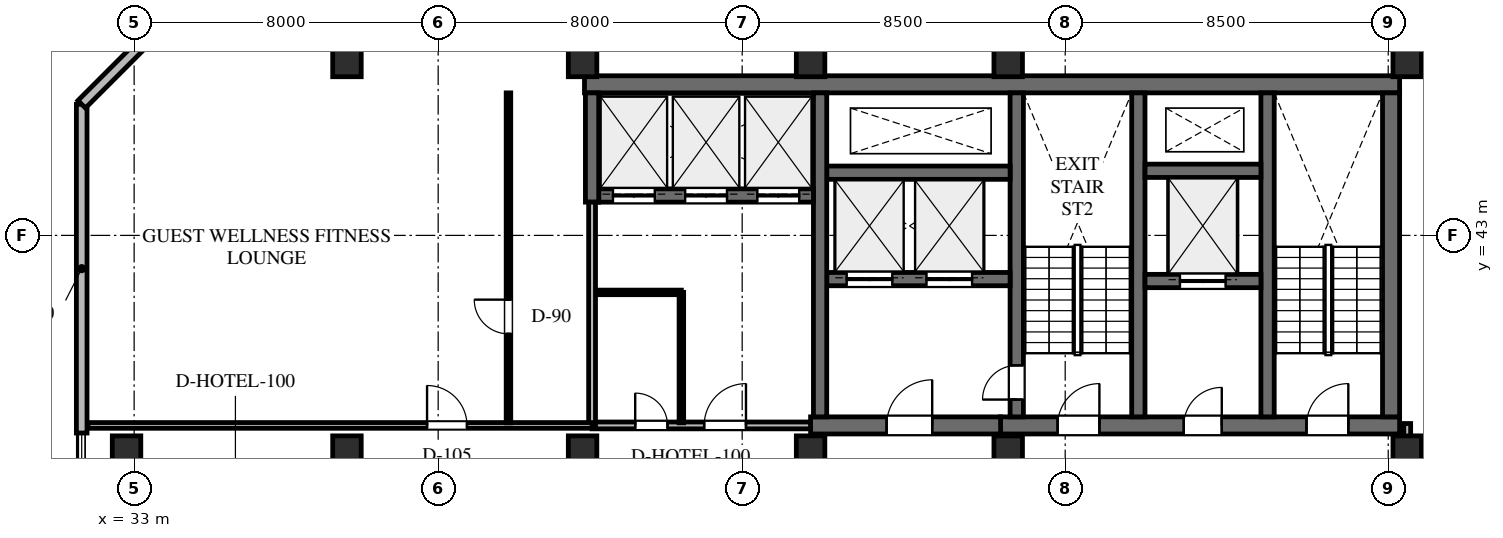
"""IFC4 building model, lengths in metres.
Left out: names, types, materials, properties, quantities, classifications, styles, units other than length and angle.
Written with IfcOpenShell. Run it as: python <this file> out.ifc"""

import sys

from ifc_helpers import new_model, si_unit, direction, frame, frame_2d, origin, origin_2d, place, context, subcontext, project, spatial, rectangle, extrude, element, fill, save


model = new_model("IFC4")
c1 = context("Model", 3, precision=1e-05, world=origin(), true_north=direction((0.0, 1.0)))
c2 = subcontext(c1, "Body", "Model", "MODEL_VIEW")
j1 = project(units=[si_unit("LENGTHUNIT", "METRE"), si_unit("PLANEANGLEUNIT", "RADIAN")], contexts=[c1])
p1 = place(None, origin())
s1 = spatial("IfcSite", under=j1, at=p1, CompositionType="ELEMENT")
p2 = place(p1, origin())
s2 = spatial("IfcBuilding", under=s1, at=p2, CompositionType="ELEMENT")
p3 = place(p2, frame((0.0, 0.0, 282.3)))
s3 = spatial("IfcBuildingStorey", under=s2, at=p3, CompositionType="ELEMENT", Elevation=282.3)
p4 = place(p3, frame((44.85, 46.975, 0.0), z_axis=(0.0, 0.0, 1.0), x_axis=(1.0, 0.0, 0.0)))
e1 = element("IfcWall", 1, at=p4, inside=s3, PredefinedType="SHEAR", context=c2, shape_type="SweptSolid", body=[
    extrude(rectangle(XDim=21.45, YDim=0.45, at=frame_2d((10.725, 0.0))), origin(), (0.0, 0.0, 1.0), 3.6),
])
p5 = place(p3, frame((55.8, 38.0, 0.0), z_axis=(0.0, 0.0, 1.0), x_axis=(1.0, 0.0, 0.0)))
e2 = element("IfcWall", 2, at=p5, inside=s3, PredefinedType="SHEAR", context=c2, shape_type="SweptSolid", body=[
    extrude(rectangle(XDim=10.5, YDim=0.45, at=frame_2d((5.25, 0.0))), origin(), (0.0, 0.0, 1.0), 3.6),
])
p6 = place(p5, frame((1.5, 0.0, 0.0)))
e3 = element("IfcOpeningElement", 3, at=p6, cuts=e2, PredefinedType="OPENING", context=c2, shape_type="SweptSolid", body=[
    extrude(rectangle(XDim=1.1, YDim=2.2, at=frame_2d((0.55, 1.1))), frame((0.0, 0.235, 0.0), z_axis=(0.0, -1.0, 0.0), x_axis=(1.0, 0.0, 0.0)), (0.0, 0.0, 1.0), 0.47),
])
p7 = place(p5, frame((4.82, 0.0, 0.0)))
e4 = element("IfcOpeningElement", 4, at=p7, cuts=e2, PredefinedType="OPENING", context=c2, shape_type="SweptSolid", body=[
    extrude(rectangle(XDim=1.0, YDim=2.15, at=frame_2d((0.5, 1.075))), frame((0.0, 0.235, 0.0), z_axis=(0.0, -1.0, 0.0), x_axis=(1.0, 0.0, 0.0)), (0.0, 0.0, 1.0), 0.47),
])
p8 = place(p5, frame((8.05, 0.0, 0.0)))
e5 = element("IfcOpeningElement", 5, at=p8, cuts=e2, PredefinedType="OPENING", context=c2, shape_type="SweptSolid", body=[
    extrude(rectangle(XDim=1.1, YDim=2.2, at=frame_2d((0.55, 1.1))), frame((0.0, 0.235, 0.0), z_axis=(0.0, -1.0, 0.0), x_axis=(1.0, 0.0, 0.0)), (0.0, 0.0, 1.0), 0.47),
])
p9 = place(p3, frame((66.075, 38.225, 0.0), z_axis=(0.0, 0.0, 1.0), x_axis=(0.0, 1.0, 0.0)))
e6 = element("IfcWall", 6, at=p9, inside=s3, PredefinedType="SHEAR", context=c2, shape_type="SweptSolid", body=[
    extrude(rectangle(XDim=8.525, YDim=0.45, at=frame_2d((4.262, 0.0))), origin(), (0.0, 0.0, 1.0), 3.6),
])
for number, where, z_axis, x_axis in (
    (7, (62.825, 38.225, 0.0), (0.0, 0.0, 1.0), (0.0, 1.0, 0.0)),
    (8, (59.425, 38.225, 0.0), (0.0, 0.0, 1.0), (0.0, 1.0, 0.0)),
):
    element("IfcWall", number, at=place(p3, frame(where, z_axis=z_axis, x_axis=x_axis)), inside=s3, PredefinedType="SHEAR", context=c2, shape_type="SweptSolid", body=[
        extrude(rectangle(XDim=8.525, YDim=0.35, at=frame_2d((4.262, 0.0))), origin(), (0.0, 0.0, 1.0), 3.6),
    ])
p10 = place(p3, frame((56.225, 38.225, 0.0), z_axis=(0.0, 0.0, 1.0), x_axis=(0.0, 1.0, 0.0)))
e9 = element("IfcWall", 9, at=p10, inside=s3, PredefinedType="SHEAR", context=c2, shape_type="SweptSolid", body=[
    extrude(rectangle(XDim=8.525, YDim=0.35, at=frame_2d((4.262, 0.0))), origin(), (0.0, 0.0, 1.0), 3.6),
])
p11 = place(p10, frame((0.455, 0.0, 0.0)))
e10 = element("IfcOpeningElement", 10, at=p11, cuts=e9, PredefinedType="OPENING", context=c2, shape_type="SweptSolid", body=[
    extrude(rectangle(XDim=0.9, YDim=2.15, at=frame_2d((0.45, 1.075))), frame((0.0, 0.185, 0.0), z_axis=(0.0, -1.0, 0.0), x_axis=(1.0, 0.0, 0.0)), (0.0, 0.0, 1.0), 0.37),
])
p12 = place(p3, frame((59.6, 41.8, 0.0), z_axis=(0.0, 0.0, 1.0), x_axis=(1.0, 0.0, 0.0)))
e11 = element("IfcWall", 11, at=p12, inside=s3, PredefinedType="SHEAR", context=c2, shape_type="SweptSolid", body=[
    extrude(rectangle(XDim=3.05, YDim=0.35, at=frame_2d((1.525, 0.0))), origin(), (0.0, 0.0, 1.0), 3.6),
])
p13 = place(p12, frame((0.92, 0.0, 0.0)))
e12 = element("IfcOpeningElement", 12, at=p13, cuts=e11, PredefinedType="OPENING", context=c2, shape_type="SweptSolid", body=[
    extrude(rectangle(XDim=1.2, YDim=2.2, at=frame_2d((0.6, 1.1))), frame((0.0, 0.185, 0.0), z_axis=(0.0, -1.0, 0.0), x_axis=(1.0, 0.0, 0.0)), (0.0, 0.0, 1.0), 0.37),
])
p14 = place(p3, frame((59.6, 44.7, 0.0), z_axis=(0.0, 0.0, 1.0), x_axis=(1.0, 0.0, 0.0)))
e13 = element("IfcWall", 13, at=p14, inside=s3, PredefinedType="SHEAR", context=c2, shape_type="SweptSolid", body=[
    extrude(rectangle(XDim=3.05, YDim=0.35, at=frame_2d((1.525, 0.0))), origin(), (0.0, 0.0, 1.0), 3.6),
])
p15 = place(p3, frame((50.8, 38.0, 0.0), z_axis=(0.0, 0.0, 1.0), x_axis=(1.0, 0.0, 0.0)))
e14 = element("IfcWall", 14, at=p15, inside=s3, PredefinedType="SHEAR", context=c2, shape_type="SweptSolid", body=[
    extrude(rectangle(XDim=5.0, YDim=0.45, at=frame_2d((2.5, 0.0))), origin(), (0.0, 0.0, 1.0), 3.6),
])
p16 = place(p15, frame((2.0, 0.0, 0.0)))
e15 = element("IfcOpeningElement", 15, at=p16, cuts=e14, PredefinedType="OPENING", context=c2, shape_type="SweptSolid", body=[
    extrude(rectangle(XDim=1.2, YDim=2.2, at=frame_2d((0.6, 1.1))), frame((0.0, 0.235, 0.0), z_axis=(0.0, -1.0, 0.0), x_axis=(1.0, 0.0, 0.0)), (0.0, 0.0, 1.0), 0.47),
])
p17 = place(p3, frame((51.225, 41.85, 0.0), z_axis=(0.0, 0.0, 1.0), x_axis=(1.0, 0.0, 0.0)))
e16 = element("IfcWall", 16, at=p17, inside=s3, PredefinedType="SHEAR", context=c2, shape_type="SweptSolid", body=[
    extrude(rectangle(XDim=4.825, YDim=0.35, at=frame_2d((2.413, 0.0))), origin(), (0.0, 0.0, 1.0), 3.6),
])
p18 = place(p17, frame((0.525, 0.0, 0.0)))
e17 = element("IfcOpeningElement", 17, at=p18, cuts=e16, PredefinedType="OPENING", context=c2, shape_type="SweptSolid", body=[
    extrude(rectangle(XDim=1.2, YDim=2.2, at=frame_2d((0.6, 1.1))), frame((0.0, 0.185, 0.0), z_axis=(0.0, -1.0, 0.0), x_axis=(1.0, 0.0, 0.0)), (0.0, 0.0, 1.0), 0.37),
])
p19 = place(p17, frame((2.625, 0.0, 0.0)))
e18 = element("IfcOpeningElement", 18, at=p19, cuts=e16, PredefinedType="OPENING", context=c2, shape_type="SweptSolid", body=[
    extrude(rectangle(XDim=1.2, YDim=2.2, at=frame_2d((0.6, 1.1))), frame((0.0, 0.185, 0.0), z_axis=(0.0, -1.0, 0.0), x_axis=(1.0, 0.0, 0.0)), (0.0, 0.0, 1.0), 0.37),
])
p20 = place(p3, frame((51.225, 44.65, 0.0), z_axis=(0.0, 0.0, 1.0), x_axis=(1.0, 0.0, 0.0)))
e19 = element("IfcWall", 19, at=p20, inside=s3, PredefinedType="SHEAR", context=c2, shape_type="SweptSolid", body=[
    extrude(rectangle(XDim=4.825, YDim=0.35, at=frame_2d((2.413, 0.0))), origin(), (0.0, 0.0, 1.0), 3.6),
])
p21 = place(p3, frame((51.05, 38.225, 0.0), z_axis=(0.0, 0.0, 1.0), x_axis=(0.0, 1.0, 0.0)))
e20 = element("IfcWall", 20, at=p21, inside=s3, PredefinedType="SHEAR", context=c2, shape_type="SweptSolid", body=[
    extrude(rectangle(XDim=8.525, YDim=0.35, at=frame_2d((4.262, 0.0))), origin(), (0.0, 0.0, 1.0), 3.6),
])
p22 = place(p3, frame((45.225, 44.05, 0.0), z_axis=(0.0, 0.0, 1.0), x_axis=(1.0, 0.0, 0.0)))
e21 = element("IfcWall", 21, at=p22, inside=s3, PredefinedType="SHEAR", context=c2, shape_type="SweptSolid", body=[
    extrude(rectangle(XDim=5.65, YDim=0.35, at=frame_2d((2.825, 0.0))), origin(), (0.0, 0.0, 1.0), 3.6),
])
p23 = place(p22, frame((0.375, 0.0, 0.0)))
e22 = element("IfcOpeningElement", 22, at=p23, cuts=e21, PredefinedType="OPENING", context=c2, shape_type="SweptSolid", body=[
    extrude(rectangle(XDim=1.1, YDim=2.2, at=frame_2d((0.55, 1.1))), frame((0.0, 0.185, 0.0), z_axis=(0.0, -1.0, 0.0), x_axis=(1.0, 0.0, 0.0)), (0.0, 0.0, 1.0), 0.37),
])
p24 = place(p22, frame((2.275, 0.0, 0.0)))
e23 = element("IfcOpeningElement", 23, at=p24, cuts=e21, PredefinedType="OPENING", context=c2, shape_type="SweptSolid", body=[
    extrude(rectangle(XDim=1.1, YDim=2.2, at=frame_2d((0.55, 1.1))), frame((0.0, 0.185, 0.0), z_axis=(0.0, -1.0, 0.0), x_axis=(1.0, 0.0, 0.0)), (0.0, 0.0, 1.0), 0.37),
])
p25 = place(p22, frame((4.175, 0.0, 0.0)))
e24 = element("IfcOpeningElement", 24, at=p25, cuts=e21, PredefinedType="OPENING", context=c2, shape_type="SweptSolid", body=[
    extrude(rectangle(XDim=1.1, YDim=2.2, at=frame_2d((0.55, 1.1))), frame((0.0, 0.185, 0.0), z_axis=(0.0, -1.0, 0.0), x_axis=(1.0, 0.0, 0.0)), (0.0, 0.0, 1.0), 0.37),
])
p26 = place(p3, frame((45.05, 43.875, 0.0), z_axis=(0.0, 0.0, 1.0), x_axis=(0.0, 1.0, 0.0)))
e25 = element("IfcWall", 25, at=p26, inside=s3, PredefinedType="SHEAR", context=c2, shape_type="SweptSolid", body=[
    extrude(rectangle(XDim=2.875, YDim=0.35, at=frame_2d((1.438, 0.0))), origin(), (0.0, 0.0, 1.0), 3.6),
])
for number, where, z_axis, x_axis in (
    (26, (66.5, 47.55, 0.0), (0.0, 0.0, 1.0), (1.0, 0.0, 0.0)),
    (27, (56.0, 47.55, 0.0), (0.0, 0.0, 1.0), (1.0, 0.0, 0.0)),
    (28, (66.5, 37.35, 0.0), (0.0, 0.0, 1.0), (1.0, 0.0, 0.0)),
    (29, (56.0, 37.35, 0.0), (0.0, 0.0, 1.0), (1.0, 0.0, 0.0)),
    (30, (50.8, 47.55, 0.0), (0.0, 0.0, 1.0), (1.0, 0.0, 0.0)),
    (31, (50.8, 37.35, 0.0), (0.0, 0.0, 1.0), (1.0, 0.0, 0.0)),
    (32, (44.8, 37.35, 0.0), (0.0, 0.0, 1.0), (1.0, 0.0, 0.0)),
    (33, (44.8, 47.55, 0.0), (0.0, 0.0, 1.0), (1.0, 0.0, 0.0)),
    (34, (38.6, 37.35, 0.0), (0.0, 0.0, 1.0), (1.0, 0.0, 0.0)),
    (35, (38.6, 47.55, 0.0), (0.0, 0.0, 1.0), (1.0, 0.0, 0.0)),
    (36, (32.8, 37.35, 0.0), (0.0, 0.0, 1.0), (1.0, 0.0, 0.0)),
):
    element("IfcColumn", number, at=place(p3, frame(where, z_axis=z_axis, x_axis=x_axis)), inside=s3, PredefinedType="COLUMN", context=c2, shape_type="SweptSolid", body=[
        extrude(rectangle(XDim=0.75, YDim=0.75, at=origin_2d()), origin(), (0.0, 0.0, 1.0), 3.6),
    ])
p27 = place(p3, frame((31.62, 37.8, 0.0), z_axis=(0.0, 0.0, 1.0), x_axis=(0.0, 1.0, 0.0)))
e37 = element("IfcWall", 37, at=p27, inside=s3, PredefinedType="STANDARD", context=c2, shape_type="SweptSolid", body=[
    extrude(rectangle(XDim=8.65, YDim=0.28, at=frame_2d((4.325, 0.0))), origin(), (0.0, 0.0, 1.0), 3.365),
])
p28 = place(p3, frame((31.62, 46.45, 0.0), z_axis=(0.0, 0.0, 1.0), x_axis=(0.707106781187, 0.707106781187, 0.0)))
e38 = element("IfcWall", 38, at=p28, inside=s3, PredefinedType="STANDARD", context=c2, shape_type="SweptSolid", body=[
    extrude(rectangle(XDim=2.729, YDim=0.28, at=frame_2d((1.365, 0.0))), origin(), (0.0, 0.0, 1.0), 3.365),
])
p29 = place(p3, frame((68.375, 37.8, 0.0), z_axis=(0.0, 0.0, 1.0), x_axis=(-0.139171056495, -0.99026835607, 0.0)))
e39 = element("IfcWall", 39, at=p29, inside=s3, PredefinedType="STANDARD", context=c2, shape_type="SweptSolid", body=[
    extrude(rectangle(XDim=16.923, YDim=0.28, at=frame_2d((8.462, 0.0))), origin(), (0.0, 0.0, 1.0), 3.365),
])
p30 = place(p29, frame((7.915, 0.0, 0.0)))
e40 = element("IfcOpeningElement", 40, at=p30, cuts=e39, PredefinedType="OPENING", context=c2, shape_type="SweptSolid", body=[
    extrude(rectangle(XDim=1.0, YDim=2.15, at=frame_2d((0.5, 1.075))), frame((0.0, 0.15, 0.0), z_axis=(0.0, -1.0, 0.0), x_axis=(1.0, 0.0, 0.0)), (0.0, 0.0, 1.0), 0.3),
])
p31 = place(p29, frame((3.634, 0.0, 0.65)))
e41 = element("IfcOpeningElement", 41, at=p31, cuts=e39, PredefinedType="OPENING", context=c2, shape_type="SweptSolid", body=[
    extrude(rectangle(XDim=1.8, YDim=2.1, at=frame_2d((0.9, 1.05))), frame((0.0, 0.15, 0.0), z_axis=(0.0, -1.0, 0.0), x_axis=(1.0, 0.0, 0.0)), (0.0, 0.0, 1.0), 0.3),
])
p32 = place(p29, frame((11.852, 0.0, 0.65)))
e42 = element("IfcOpeningElement", 42, at=p32, cuts=e39, PredefinedType="OPENING", context=c2, shape_type="SweptSolid", body=[
    extrude(rectangle(XDim=1.8, YDim=2.1, at=frame_2d((0.9, 1.05))), frame((0.0, 0.15, 0.0), z_axis=(0.0, -1.0, 0.0), x_axis=(1.0, 0.0, 0.0)), (0.0, 0.0, 1.0), 0.3),
])
p33 = place(p3, frame((45.05, 38.0, 0.0), z_axis=(0.0, 0.0, 1.0), x_axis=(1.0, 0.0, 0.0)))
e43 = element("IfcWall", 43, at=p33, inside=s3, PredefinedType="STANDARD", context=c2, shape_type="SweptSolid", body=[
    extrude(rectangle(XDim=5.75, YDim=0.18, at=frame_2d((2.875, 0.0))), origin(), (0.0, 0.0, 1.0), 2.754),
])
p34 = place(p33, frame((1.135, 0.0, 0.0)))
e44 = element("IfcOpeningElement", 44, at=p34, cuts=e43, PredefinedType="OPENING", context=c2, shape_type="SweptSolid", body=[
    extrude(rectangle(XDim=0.85, YDim=2.1, at=frame_2d((0.425, 1.05))), frame((0.0, 0.1, 0.0), z_axis=(0.0, -1.0, 0.0), x_axis=(1.0, 0.0, 0.0)), (0.0, 0.0, 1.0), 0.2),
])
p35 = place(p33, frame((2.95, 0.0, 0.0)))
e45 = element("IfcOpeningElement", 45, at=p35, cuts=e43, PredefinedType="OPENING", context=c2, shape_type="SweptSolid", body=[
    extrude(rectangle(XDim=1.1, YDim=2.2, at=frame_2d((0.55, 1.1))), frame((0.0, 0.1, 0.0), z_axis=(0.0, -1.0, 0.0), x_axis=(1.0, 0.0, 0.0)), (0.0, 0.0, 1.0), 0.2),
])
p36 = place(p3, frame((47.4, 38.068, 0.0), z_axis=(0.0, 0.0, 1.0), x_axis=(0.0, 1.0, 0.0)))
e46 = element("IfcWall", 46, at=p36, inside=s3, PredefinedType="PARTITIONING", context=c2, shape_type="SweptSolid", body=[
    extrude(rectangle(XDim=3.432, YDim=0.12, at=frame_2d((1.716, 0.0))), origin(), (0.0, 0.0, 1.0), 3.365),
])
p37 = place(p3, frame((45.118, 41.5, 0.0), z_axis=(0.0, 0.0, 1.0), x_axis=(1.0, 0.0, 0.0)))
e47 = element("IfcWall", 47, at=p37, inside=s3, PredefinedType="PARTITIONING", context=c2, shape_type="SweptSolid", body=[
    extrude(rectangle(XDim=2.282, YDim=0.12, at=frame_2d((1.141, 0.0))), origin(), (0.0, 0.0, 1.0), 3.365),
])
p38 = place(p3, frame((45.05, 38.0, 0.0), z_axis=(0.0, 0.0, 1.0), x_axis=(0.0, 1.0, 0.0)))
e48 = element("IfcWall", 48, at=p38, inside=s3, PredefinedType="STANDARD", context=c2, shape_type="SweptSolid", body=[
    extrude(rectangle(XDim=5.875, YDim=0.18, at=frame_2d((2.938, 0.0))), origin(), (0.0, 0.0, 1.0), 2.754),
])
p39 = place(p3, frame((31.785, 38.0, 0.0), z_axis=(0.0, 0.0, 1.0), x_axis=(1.0, 0.0, 0.0)))
e49 = element("IfcWall", 49, at=p39, inside=s3, PredefinedType="PARTITIONING", context=c2, shape_type="SweptSolid", body=[
    extrude(rectangle(XDim=13.265, YDim=0.15, at=frame_2d((6.633, 0.0))), origin(), (0.0, 0.0, 1.0), 2.754),
])
p40 = place(p39, frame((8.923, 0.0, 0.0)))
e50 = element("IfcOpeningElement", 50, at=p40, cuts=e49, PredefinedType="OPENING", context=c2, shape_type="SweptSolid", body=[
    extrude(rectangle(XDim=1.05, YDim=2.2, at=frame_2d((0.525, 1.1))), frame((0.0, 0.085, 0.0), z_axis=(0.0, -1.0, 0.0), x_axis=(1.0, 0.0, 0.0)), (0.0, 0.0, 1.0), 0.17),
])
p41 = place(p3, frame((42.85, 38.068, 0.0), z_axis=(0.0, 0.0, 1.0), x_axis=(0.0, 1.0, 0.0)))
e51 = element("IfcWall", 51, at=p41, inside=s3, PredefinedType="PARTITIONING", context=c2, shape_type="SweptSolid", body=[
    extrude(rectangle(XDim=8.682, YDim=0.12, at=frame_2d((4.341, 0.0))), origin(), (0.0, 0.0, 1.0), 3.365),
])
p42 = place(p41, frame((2.342, 0.0, 0.0)))
e52 = element("IfcOpeningElement", 52, at=p42, cuts=e51, PredefinedType="OPENING", context=c2, shape_type="SweptSolid", body=[
    extrude(rectangle(XDim=0.9, YDim=2.1, at=frame_2d((0.45, 1.05))), frame((0.0, 0.07, 0.0), z_axis=(0.0, -1.0, 0.0), x_axis=(1.0, 0.0, 0.0)), (0.0, 0.0, 1.0), 0.14),
])
p43 = place(p3, frame((66.5, 35.468, 0.0), z_axis=(0.0, 0.0, 1.0), x_axis=(0.0, 1.0, 0.0)))
e53 = element("IfcWall", 53, at=p43, inside=s3, PredefinedType="STANDARD", context=c2, shape_type="SweptSolid", body=[
    extrude(rectangle(XDim=2.582, YDim=0.18, at=frame_2d((1.291, 0.0))), origin(), (0.0, 0.0, 1.0), 2.754),
])
p44 = place(p6, origin())
e54 = element("IfcDoor", 54, at=p44, inside=s3, OperationType="SINGLE_SWING_RIGHT", PredefinedType="DOOR", context=c2, shape_type="SweptSolid", body=[
    extrude(rectangle(XDim=1.1, YDim=2.2, at=frame_2d((0.55, 1.1))), frame((0.0, 0.025, 0.0), z_axis=(0.0, -1.0, 0.0), x_axis=(1.0, 0.0, 0.0)), (0.0, 0.0, 1.0), 0.05),
])
fill(e3, e54)
p45 = place(p7, origin())
e55 = element("IfcDoor", 55, at=p45, inside=s3, OperationType="SINGLE_SWING_RIGHT", PredefinedType="DOOR", context=c2, shape_type="SweptSolid", body=[
    extrude(rectangle(XDim=1.0, YDim=2.15, at=frame_2d((0.5, 1.075))), frame((0.0, 0.025, 0.0), z_axis=(0.0, -1.0, 0.0), x_axis=(1.0, 0.0, 0.0)), (0.0, 0.0, 1.0), 0.05),
])
fill(e4, e55)
p46 = place(p8, origin())
e56 = element("IfcDoor", 56, at=p46, inside=s3, OperationType="SINGLE_SWING_RIGHT", PredefinedType="DOOR", context=c2, shape_type="SweptSolid", body=[
    extrude(rectangle(XDim=1.1, YDim=2.2, at=frame_2d((0.55, 1.1))), frame((0.0, 0.025, 0.0), z_axis=(0.0, -1.0, 0.0), x_axis=(1.0, 0.0, 0.0)), (0.0, 0.0, 1.0), 0.05),
])
fill(e5, e56)
p47 = place(p16, origin())
e57 = element("IfcDoor", 57, at=p47, inside=s3, OperationType="SINGLE_SWING_RIGHT", PredefinedType="DOOR", context=c2, shape_type="SweptSolid", body=[
    extrude(rectangle(XDim=1.2, YDim=2.2, at=frame_2d((0.6, 1.1))), frame((0.0, 0.025, 0.0), z_axis=(0.0, -1.0, 0.0), x_axis=(1.0, 0.0, 0.0)), (0.0, 0.0, 1.0), 0.05),
])
fill(e15, e57)
p48 = place(p11, origin())
e58 = element("IfcDoor", 58, at=p48, inside=s3, OperationType="SINGLE_SWING_LEFT", PredefinedType="DOOR", context=c2, shape_type="SweptSolid", body=[
    extrude(rectangle(XDim=0.9, YDim=2.15, at=frame_2d((0.45, 1.075))), frame((0.0, 0.025, 0.0), z_axis=(0.0, -1.0, 0.0), x_axis=(1.0, 0.0, 0.0)), (0.0, 0.0, 1.0), 0.05),
])
fill(e10, e58)
p49 = place(p23, origin())
e59 = element("IfcDoor", 59, at=p49, inside=s3, OperationType="DOUBLE_DOOR_SLIDING", PredefinedType="DOOR", context=c2, shape_type="SweptSolid", body=[
    extrude(rectangle(XDim=1.1, YDim=2.2, at=frame_2d((0.55, 1.1))), frame((0.0, 0.025, 0.0), z_axis=(0.0, -1.0, 0.0), x_axis=(1.0, 0.0, 0.0)), (0.0, 0.0, 1.0), 0.05),
])
fill(e22, e59)
p50 = place(p24, origin())
e60 = element("IfcDoor", 60, at=p50, inside=s3, OperationType="DOUBLE_DOOR_SLIDING", PredefinedType="DOOR", context=c2, shape_type="SweptSolid", body=[
    extrude(rectangle(XDim=1.1, YDim=2.2, at=frame_2d((0.55, 1.1))), frame((0.0, 0.025, 0.0), z_axis=(0.0, -1.0, 0.0), x_axis=(1.0, 0.0, 0.0)), (0.0, 0.0, 1.0), 0.05),
])
fill(e23, e60)
p51 = place(p25, origin())
e61 = element("IfcDoor", 61, at=p51, inside=s3, OperationType="DOUBLE_DOOR_SLIDING", PredefinedType="DOOR", context=c2, shape_type="SweptSolid", body=[
    extrude(rectangle(XDim=1.1, YDim=2.2, at=frame_2d((0.55, 1.1))), frame((0.0, 0.025, 0.0), z_axis=(0.0, -1.0, 0.0), x_axis=(1.0, 0.0, 0.0)), (0.0, 0.0, 1.0), 0.05),
])
fill(e24, e61)
p52 = place(p18, origin())
e62 = element("IfcDoor", 62, at=p52, inside=s3, OperationType="DOUBLE_DOOR_SLIDING", PredefinedType="DOOR", context=c2, shape_type="SweptSolid", body=[
    extrude(rectangle(XDim=1.2, YDim=2.2, at=frame_2d((0.6, 1.1))), frame((0.0, 0.025, 0.0), z_axis=(0.0, -1.0, 0.0), x_axis=(1.0, 0.0, 0.0)), (0.0, 0.0, 1.0), 0.05),
])
fill(e17, e62)
p53 = place(p19, origin())
e63 = element("IfcDoor", 63, at=p53, inside=s3, OperationType="DOUBLE_DOOR_SLIDING", PredefinedType="DOOR", context=c2, shape_type="SweptSolid", body=[
    extrude(rectangle(XDim=1.2, YDim=2.2, at=frame_2d((0.6, 1.1))), frame((0.0, 0.025, 0.0), z_axis=(0.0, -1.0, 0.0), x_axis=(1.0, 0.0, 0.0)), (0.0, 0.0, 1.0), 0.05),
])
fill(e18, e63)
p54 = place(p13, origin())
e64 = element("IfcDoor", 64, at=p54, inside=s3, OperationType="DOUBLE_DOOR_SLIDING", PredefinedType="DOOR", context=c2, shape_type="SweptSolid", body=[
    extrude(rectangle(XDim=1.2, YDim=2.2, at=frame_2d((0.6, 1.1))), frame((0.0, 0.025, 0.0), z_axis=(0.0, -1.0, 0.0), x_axis=(1.0, 0.0, 0.0)), (0.0, 0.0, 1.0), 0.05),
])
fill(e12, e64)
p55 = place(p34, origin())
e65 = element("IfcDoor", 65, at=p55, inside=s3, OperationType="SINGLE_SWING_LEFT", PredefinedType="DOOR", context=c2, shape_type="SweptSolid", body=[
    extrude(rectangle(XDim=0.85, YDim=2.1, at=frame_2d((0.425, 1.05))), frame((0.0, 0.025, 0.0), z_axis=(0.0, -1.0, 0.0), x_axis=(1.0, 0.0, 0.0)), (0.0, 0.0, 1.0), 0.05),
])
fill(e44, e65)
p56 = place(p35, origin())
e66 = element("IfcDoor", 66, at=p56, inside=s3, OperationType="SINGLE_SWING_RIGHT", PredefinedType="DOOR", context=c2, shape_type="SweptSolid", body=[
    extrude(rectangle(XDim=1.1, YDim=2.2, at=frame_2d((0.55, 1.1))), frame((0.0, 0.025, 0.0), z_axis=(0.0, -1.0, 0.0), x_axis=(1.0, 0.0, 0.0)), (0.0, 0.0, 1.0), 0.05),
])
fill(e45, e66)
p57 = place(p40, origin())
e67 = element("IfcDoor", 67, at=p57, inside=s3, OperationType="SINGLE_SWING_LEFT", PredefinedType="DOOR", context=c2, shape_type="SweptSolid", body=[
    extrude(rectangle(XDim=1.05, YDim=2.2, at=frame_2d((0.525, 1.1))), frame((0.0, 0.025, 0.0), z_axis=(0.0, -1.0, 0.0), x_axis=(1.0, 0.0, 0.0)), (0.0, 0.0, 1.0), 0.05),
])
fill(e50, e67)
p58 = place(p42, origin())
e68 = element("IfcDoor", 68, at=p58, inside=s3, OperationType="SINGLE_SWING_RIGHT", PredefinedType="DOOR", context=c2, shape_type="SweptSolid", body=[
    extrude(rectangle(XDim=0.9, YDim=2.1, at=frame_2d((0.45, 1.05))), frame((0.0, 0.025, 0.0), z_axis=(0.0, -1.0, 0.0), x_axis=(1.0, 0.0, 0.0)), (0.0, 0.0, 1.0), 0.05),
])
fill(e52, e68)
save(model, sys.argv[1])
